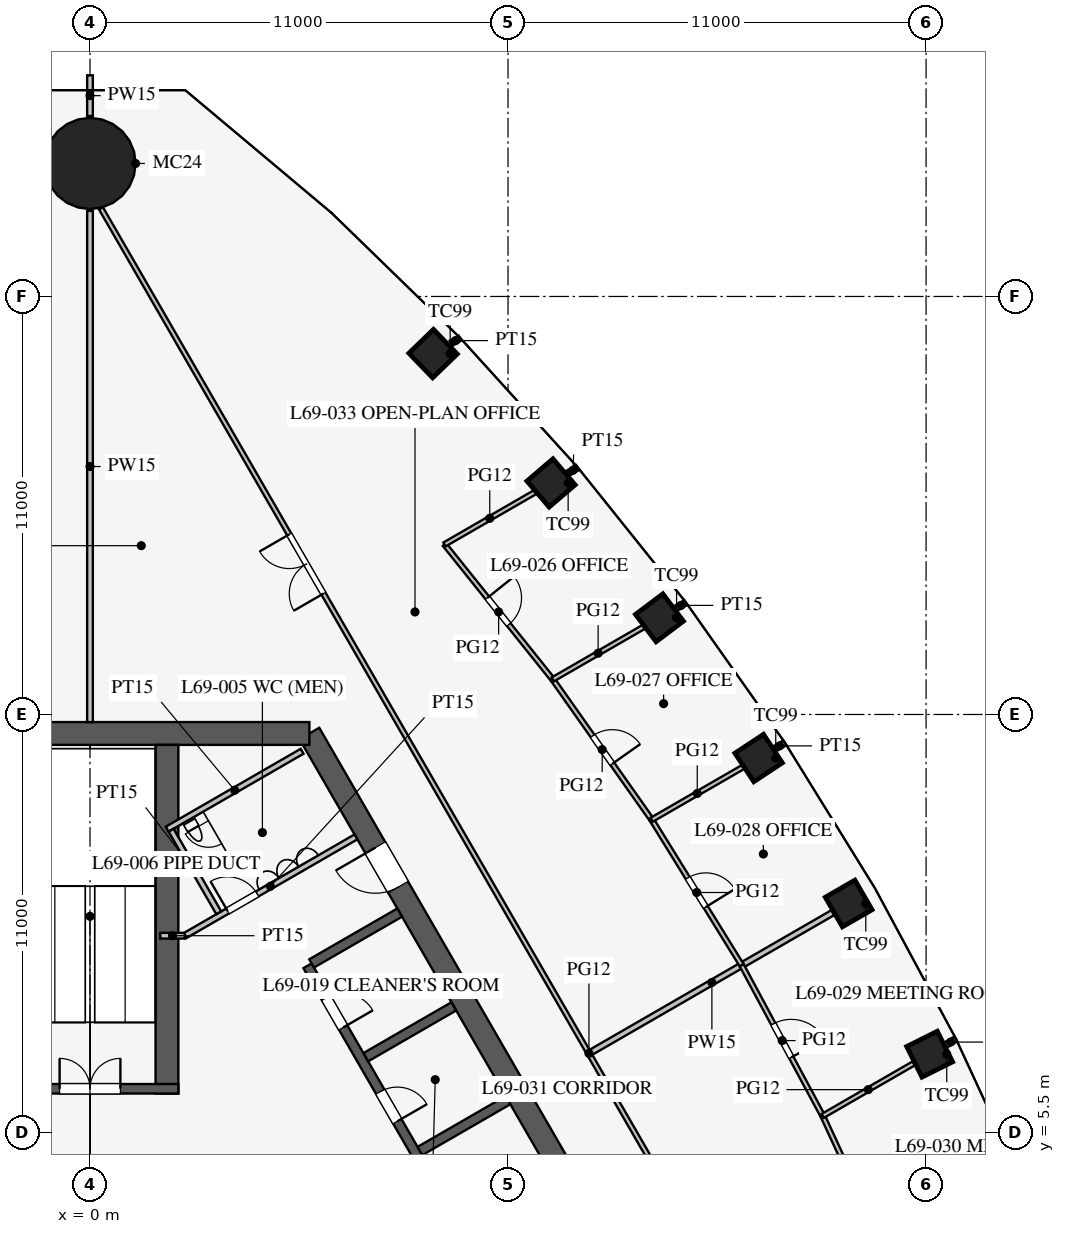
"""IFC4 building model, lengths in metres.
Left out: names, types, materials, properties, quantities, classifications, styles, units other than length and angle.
Written with IfcOpenShell. Run it as: python <this file> out.ifc"""

import sys

from ifc_helpers import new_model, si_unit, direction, frame, frame_2d, origin, origin_2d, place, context, subcontext, project, spatial, rectangle, circle, extrude, element, fill, save


model = new_model("IFC4")
c1 = context("Model", 3, precision=1e-05, world=origin(), true_north=direction((0.0, 1.0)))
c2 = subcontext(c1, "Body", "Model", "MODEL_VIEW")
j1 = project(units=[si_unit("LENGTHUNIT", "METRE"), si_unit("PLANEANGLEUNIT", "RADIAN")], contexts=[c1])
p1 = place(None, origin())
s1 = spatial("IfcSite", under=j1, at=p1, CompositionType="ELEMENT")
p2 = place(p1, origin())
s2 = spatial("IfcBuilding", under=s1, at=p2, CompositionType="ELEMENT")
p3 = place(p2, frame((0.0, 0.0, 301.5)))
s3 = spatial("IfcBuildingStorey", under=s2, at=p3, CompositionType="ELEMENT", Elevation=301.5)
for number, where, z_axis, x_axis in (
    (1, (22.094, 7.56, 0.0), (0.0, 0.0, 1.0), (-0.447, 0.895, 0.0)),
    (2, (19.963, 11.526, 0.0), (0.0, 0.0, 1.0), (-0.5, 0.866, 0.0)),
    (3, (17.594, 15.354, 0.0), (0.0, 0.0, 1.0), (-0.552, 0.834, 0.0)),
    (4, (14.985, 19.044, 0.0), (0.0, 0.0, 1.0), (-0.601, 0.799, 0.0)),
    (5, (12.132, 22.593, 0.0), (0.0, 0.0, 1.0), (-0.649, 0.761, 0.0)),
    (6, (9.027, 25.997, 0.0), (0.0, 0.0, 1.0), (-0.695, 0.719, 0.0)),
):
    element("IfcColumn", number, at=place(p3, frame(where, z_axis=z_axis, x_axis=x_axis)), inside=s3, PredefinedType="COLUMN", context=c2, shape_type="SweptSolid", body=[
        extrude(rectangle(XDim=0.9, YDim=0.9, at=origin_2d()), origin(), (0.0, 0.0, 1.0), 4.2),
    ])
p4 = place(p3, frame((0.0, 31.0, 0.0), z_axis=(0.0, 0.0, 1.0), x_axis=(1.0, 0.0, 0.0)))
e7 = element("IfcColumn", 7, at=p4, inside=s3, PredefinedType="COLUMN", context=c2, shape_type="SweptSolid", body=[
    extrude(circle(Radius=1.2, at=origin_2d()), origin(), (0.0, 0.0, 1.0), 4.2),
])
p5 = place(p3, frame((16.743, -3.0, 0.0), z_axis=(0.0, 0.0, 1.0), x_axis=(-0.500002442456, 0.866023993627, 0.0)))
e8 = element("IfcWall", 8, at=p5, inside=s3, PredefinedType="SHEAR", context=c2, shape_type="SweptSolid", body=[
    extrude(rectangle(XDim=21.939, YDim=0.6, at=frame_2d((10.97, 0.0))), origin(), (0.0, 0.0, 1.0), 4.2),
])
p6 = place(p5, frame((17.27, 0.0, 0.0)))
e9 = element("IfcOpeningElement", 9, at=p6, cuts=e8, PredefinedType="OPENING", context=c2, shape_type="SweptSolid", body=[
    extrude(rectangle(XDim=1.2, YDim=2.1, at=frame_2d((0.6, 1.05))), frame((0.0, 0.31, 0.0), z_axis=(0.0, -1.0, 0.0), x_axis=(1.0, 0.0, 0.0)), (0.0, 0.0, 1.0), 0.62),
])
p7 = place(p5, frame((3.47, 0.0, 0.0)))
e10 = element("IfcOpeningElement", 10, at=p7, cuts=e8, PredefinedType="OPENING", context=c2, shape_type="SweptSolid", body=[
    extrude(rectangle(XDim=1.2, YDim=2.1, at=frame_2d((0.6, 1.05))), frame((0.0, 0.31, 0.0), z_axis=(0.0, -1.0, 0.0), x_axis=(1.0, 0.0, 0.0)), (0.0, 0.0, 1.0), 0.62),
])
p8 = place(p3, frame((5.773, 16.0, 0.0), z_axis=(0.0, 0.0, 1.0), x_axis=(-1.0, 0.0, 0.0)))
e11 = element("IfcWall", 11, at=p8, inside=s3, PredefinedType="SHEAR", context=c2, shape_type="SweptSolid", body=[
    extrude(rectangle(XDim=11.547, YDim=0.6, at=frame_2d((5.773, 0.0))), origin(), (0.0, 0.0, 1.0), 4.2),
])
p9 = place(p3, frame((11.424, 0.014, 0.0), z_axis=(0.0, 0.0, 1.0), x_axis=(-0.500001763848, 0.866024385424, 0.0)))
e12 = element("IfcWall", 12, at=p9, inside=s3, PredefinedType="SHEAR", context=c2, shape_type="SweptSolid", body=[
    extrude(rectangle(XDim=11.4, YDim=0.25, at=frame_2d((5.7, 0.0))), origin(), (0.0, 0.0, 1.0), 4.2),
])
p10 = place(p9, frame((0.975, 0.0, 0.0)))
e13 = element("IfcOpeningElement", 13, at=p10, cuts=e12, PredefinedType="OPENING", context=c2, shape_type="SweptSolid", body=[
    extrude(rectangle(XDim=0.9, YDim=2.1, at=frame_2d((0.45, 1.05))), frame((0.0, 0.135, 0.0), z_axis=(0.0, -1.0, 0.0), x_axis=(1.0, 0.0, 0.0)), (0.0, 0.0, 1.0), 0.27),
])
p11 = place(p9, frame((3.825, 0.0, 0.0)))
e14 = element("IfcOpeningElement", 14, at=p11, cuts=e12, PredefinedType="OPENING", context=c2, shape_type="SweptSolid", body=[
    extrude(rectangle(XDim=0.9, YDim=2.1, at=frame_2d((0.45, 1.05))), frame((0.0, 0.135, 0.0), z_axis=(0.0, -1.0, 0.0), x_axis=(1.0, 0.0, 0.0)), (0.0, 0.0, 1.0), 0.27),
])
p12 = place(p9, frame((6.675, 0.0, 0.0)))
e15 = element("IfcOpeningElement", 15, at=p12, cuts=e12, PredefinedType="OPENING", context=c2, shape_type="SweptSolid", body=[
    extrude(rectangle(XDim=0.9, YDim=2.1, at=frame_2d((0.45, 1.05))), frame((0.0, 0.135, 0.0), z_axis=(0.0, -1.0, 0.0), x_axis=(1.0, 0.0, 0.0)), (0.0, 0.0, 1.0), 0.27),
])
p13 = place(p9, frame((9.525, 0.0, 0.0)))
e16 = element("IfcOpeningElement", 16, at=p13, cuts=e12, PredefinedType="OPENING", context=c2, shape_type="SweptSolid", body=[
    extrude(rectangle(XDim=0.9, YDim=2.1, at=frame_2d((0.45, 1.05))), frame((0.0, 0.135, 0.0), z_axis=(0.0, -1.0, 0.0), x_axis=(1.0, 0.0, 0.0)), (0.0, 0.0, 1.0), 0.27),
])
for number, where, z_axis, x_axis in (
    (17, (8.682, 5.012, 0.0), (0.0, 0.0, 1.0), (0.866, 0.5, 0.0)),
    (18, (7.257, 7.481, 0.0), (0.0, 0.0, 1.0), (0.866, 0.5, 0.0)),
    (19, (5.832, 9.949, 0.0), (0.0, 0.0, 1.0), (0.866, 0.5, 0.0)),
):
    element("IfcWall", number, at=place(p3, frame(where, z_axis=z_axis, x_axis=x_axis)), inside=s3, PredefinedType="SHEAR", context=c2, shape_type="SweptSolid", body=[
        extrude(rectangle(XDim=2.675, YDim=0.25, at=frame_2d((1.337, 0.0))), origin(), (0.0, 0.0, 1.0), 4.2),
    ])
p14 = place(p3, frame((2.025, 6.525, 0.0), z_axis=(0.0, 0.0, 1.0), x_axis=(0.0, 1.0, 0.0)))
e20 = element("IfcWall", 20, at=p14, inside=s3, PredefinedType="SHEAR", context=c2, shape_type="SweptSolid", body=[
    extrude(rectangle(XDim=9.175, YDim=0.6, at=frame_2d((4.587, 0.0))), origin(), (0.0, 0.0, 1.0), 4.2),
])
p15 = place(p3, frame((2.325, 6.65, 0.0), z_axis=(0.0, 0.0, 1.0), x_axis=(-1.0, 0.0, 0.0)))
e21 = element("IfcWall", 21, at=p15, inside=s3, PredefinedType="SHEAR", context=c2, shape_type="SweptSolid", body=[
    extrude(rectangle(XDim=4.65, YDim=0.25, at=frame_2d((2.325, 0.0))), origin(), (0.0, 0.0, 1.0), 4.2),
])
p16 = place(p15, frame((1.525, 0.0, 0.0)))
e22 = element("IfcOpeningElement", 22, at=p16, cuts=e21, PredefinedType="OPENING", context=c2, shape_type="SweptSolid", body=[
    extrude(rectangle(XDim=1.6, YDim=2.1, at=frame_2d((0.8, 1.05))), frame((0.0, 0.135, 0.0), z_axis=(0.0, -1.0, 0.0), x_axis=(1.0, 0.0, 0.0)), (0.0, 0.0, 1.0), 0.27),
])
p17 = place(p3, frame((2.495, 10.678, 0.0), z_axis=(0.0, 0.0, 1.0), x_axis=(0.866021400173, 0.500006934395, 0.0)))
e23 = element("IfcWall", 23, at=p17, inside=s3, PredefinedType="PARTITIONING", context=c2, shape_type="SweptSolid", body=[
    extrude(rectangle(XDim=5.2, YDim=0.15, at=frame_2d((2.6, 0.0))), origin(), (0.0, 0.0, 1.0), 4.0),
])
p18 = place(p17, frame((1.3, 0.0, 0.0)))
e24 = element("IfcOpeningElement", 24, at=p18, cuts=e23, PredefinedType="OPENING", context=c2, shape_type="SweptSolid", body=[
    extrude(rectangle(XDim=0.9, YDim=2.1, at=frame_2d((0.45, 1.05))), frame((0.0, 0.085, 0.0), z_axis=(0.0, -1.0, 0.0), x_axis=(1.0, 0.0, 0.0)), (0.0, 0.0, 1.0), 0.17),
])
p19 = place(p3, frame((2.495, 10.678, 0.0), z_axis=(0.0, 0.0, 1.0), x_axis=(-1.0, 0.0, 0.0)))
e25 = element("IfcWall", 25, at=p19, inside=s3, PredefinedType="PARTITIONING", context=c2, shape_type="SweptSolid", body=[
    extrude(rectangle(XDim=0.645, YDim=0.15, at=frame_2d((0.323, 0.0))), origin(), (0.0, 0.0, 1.0), 4.0),
])
p20 = place(p3, frame((2.031, 13.482, 0.0), z_axis=(0.0, 0.0, 1.0), x_axis=(0.866050731258, 0.499956128963, 0.0)))
e26 = element("IfcWall", 26, at=p20, inside=s3, PredefinedType="PARTITIONING", context=c2, shape_type="SweptSolid", body=[
    extrude(rectangle(XDim=4.1, YDim=0.15, at=frame_2d((2.05, 0.0))), origin(), (0.0, 0.0, 1.0), 4.0),
])
p21 = place(p3, frame((3.389, 11.281, 0.0), z_axis=(0.0, 0.0, 1.0), x_axis=(-0.499989096993, 0.866031698547, 0.0)))
e27 = element("IfcWall", 27, at=p21, inside=s3, PredefinedType="PARTITIONING", context=c2, shape_type="SweptSolid", body=[
    extrude(rectangle(XDim=2.51, YDim=0.15, at=frame_2d((1.255, 0.0))), origin(), (0.0, 0.0, 1.0), 4.0),
])
p22 = place(p3, frame((0.0, 16.3, 0.0), z_axis=(0.0, 0.0, 1.0), x_axis=(0.0, 1.0, 0.0)))
e28 = element("IfcWall", 28, at=p22, inside=s3, PredefinedType="PARTITIONING", context=c2, shape_type="SweptSolid", body=[
    extrude(rectangle(XDim=13.45, YDim=0.15, at=frame_2d((6.725, 0.0))), origin(), (0.0, 0.0, 1.0), 2.5),
])
p23 = place(p3, frame((0.0, 32.25, 0.0), z_axis=(0.0, 0.0, 1.0), x_axis=(0.0, 1.0, 0.0)))
e29 = element("IfcWall", 29, at=p23, inside=s3, PredefinedType="PARTITIONING", context=c2, shape_type="SweptSolid", body=[
    extrude(rectangle(XDim=1.07, YDim=0.15, at=frame_2d((0.535, 0.0))), origin(), (0.0, 0.0, 1.0), 2.5),
])
p24 = place(p3, frame((13.181, 7.61, 0.0), z_axis=(0.0, 0.0, 1.0), x_axis=(0.866027421574, 0.49999650507, 0.0)))
e30 = element("IfcWall", 30, at=p24, inside=s3, PredefinedType="PARTITIONING", context=c2, shape_type="SweptSolid", body=[
    extrude(rectangle(XDim=7.352, YDim=0.15, at=frame_2d((3.676, 0.0))), origin(), (0.0, 0.0, 1.0), 3.3),
])
p25 = place(p3, frame((25.968, -14.657, 0.0), z_axis=(0.0, 0.0, 1.0), x_axis=(-0.500000361757, 0.866025194924, 0.0)))
e31 = element("IfcWall", 31, at=p25, inside=s3, PredefinedType="PARTITIONING", context=c2, shape_type="SweptSolid", body=[
    extrude(rectangle(XDim=51.355, YDim=0.12, at=frame_2d((25.678, 0.0))), origin(), (0.0, 0.0, 1.0), 2.9),
])
p26 = place(p25, frame((9.9, 0.0, 0.15)))
e32 = element("IfcOpeningElement", 32, at=p26, cuts=e31, PredefinedType="OPENING", context=c2, shape_type="SweptSolid", body=[
    extrude(rectangle(XDim=1.8, YDim=2.1, at=frame_2d((0.9, 1.05))), frame((0.0, 0.07, 0.0), z_axis=(0.0, -1.0, 0.0), x_axis=(1.0, 0.0, 0.0)), (0.0, 0.0, 1.0), 0.14),
])
p27 = place(p25, frame((39.65, 0.0, 0.15)))
e33 = element("IfcOpeningElement", 33, at=p27, cuts=e31, PredefinedType="OPENING", context=c2, shape_type="SweptSolid", body=[
    extrude(rectangle(XDim=1.8, YDim=2.1, at=frame_2d((0.9, 1.05))), frame((0.0, 0.07, 0.0), z_axis=(0.0, -1.0, 0.0), x_axis=(1.0, 0.0, 0.0)), (0.0, 0.0, 1.0), 0.14),
])
p28 = place(p3, frame((12.589, 22.857, 0.0), z_axis=(0.0, 0.0, 1.0), x_axis=(0.865982457891, 0.500074377092, 0.0)))
e34 = element("IfcWall", 34, at=p28, inside=s3, PredefinedType="PARTITIONING", context=c2, shape_type="SweptSolid", body=[
    extrude(rectangle(XDim=0.28, YDim=0.15, at=frame_2d((0.14, 0.0))), origin(), (0.0, 0.0, 1.0), 2.9),
])
p29 = place(p3, frame((9.504, 26.271, 0.0), z_axis=(0.0, 0.0, 1.0), x_axis=(0.866004557827, 0.500036104519, 0.0)))
e35 = element("IfcWall", 35, at=p29, inside=s3, PredefinedType="PARTITIONING", context=c2, shape_type="SweptSolid", body=[
    extrude(rectangle(XDim=0.27, YDim=0.15, at=frame_2d((0.135, 0.0))), origin(), (0.0, 0.0, 1.0), 2.9),
])
p30 = place(p3, frame((18.01, 15.594, 0.0), z_axis=(0.0, 0.0, 1.0), x_axis=(0.866095534226, 0.499878510834, 0.0)))
e36 = element("IfcWall", 36, at=p30, inside=s3, PredefinedType="PARTITIONING", context=c2, shape_type="SweptSolid", body=[
    extrude(rectangle(XDim=0.316, YDim=0.15, at=frame_2d((0.158, 0.0))), origin(), (0.0, 0.0, 1.0), 2.9),
])
p31 = place(p3, frame((15.422, 19.296, 0.0), z_axis=(0.0, 0.0, 1.0), x_axis=(0.865896854829, 0.500222587251, 0.0)))
e37 = element("IfcWall", 37, at=p31, inside=s3, PredefinedType="PARTITIONING", context=c2, shape_type="SweptSolid", body=[
    extrude(rectangle(XDim=0.296, YDim=0.15, at=frame_2d((0.148, 0.0))), origin(), (0.0, 0.0, 1.0), 2.9),
])
p32 = place(p3, frame((22.51, 7.8, 0.0), z_axis=(0.0, 0.0, 1.0), x_axis=(0.866095534226, 0.499878510834, 0.0)))
e38 = element("IfcWall", 38, at=p32, inside=s3, PredefinedType="PARTITIONING", context=c2, shape_type="SweptSolid", body=[
    extrude(rectangle(XDim=0.316, YDim=0.15, at=frame_2d((0.158, 0.0))), origin(), (0.0, 0.0, 1.0), 2.9),
])
p33 = place(p3, frame((17.149, 9.901, 0.0), z_axis=(0.0, 0.0, 1.0), x_axis=(-0.525981173851, 0.850496210899, 0.0)))
e39 = element("IfcWall", 39, at=p33, inside=s3, PredefinedType="PARTITIONING", context=c2, shape_type="SweptSolid", body=[
    extrude(rectangle(XDim=4.502, YDim=0.12, at=frame_2d((2.251, 0.0))), origin(), (0.0, 0.0, 1.0), 2.9),
])
p34 = place(p33, frame((1.8, 0.0, 0.15)))
e40 = element("IfcOpeningElement", 40, at=p34, cuts=e39, PredefinedType="OPENING", context=c2, shape_type="SweptSolid", body=[
    extrude(rectangle(XDim=0.9, YDim=2.1, at=frame_2d((0.45, 1.05))), frame((0.0, 0.07, 0.0), z_axis=(0.0, -1.0, 0.0), x_axis=(1.0, 0.0, 0.0)), (0.0, 0.0, 1.0), 0.14),
])
p35 = place(p3, frame((14.781, 13.73, 0.0), z_axis=(0.0, 0.0, 1.0), x_axis=(-0.576572893039, 0.817045714151, 0.0)))
e41 = element("IfcWall", 41, at=p35, inside=s3, PredefinedType="PARTITIONING", context=c2, shape_type="SweptSolid", body=[
    extrude(rectangle(XDim=4.519, YDim=0.12, at=frame_2d((2.259, 0.0))), origin(), (0.0, 0.0, 1.0), 2.9),
])
p36 = place(p35, frame((1.8, 0.0, 0.15)))
e42 = element("IfcOpeningElement", 42, at=p36, cuts=e41, PredefinedType="OPENING", context=c2, shape_type="SweptSolid", body=[
    extrude(rectangle(XDim=0.9, YDim=2.1, at=frame_2d((0.45, 1.05))), frame((0.0, 0.07, 0.0), z_axis=(0.0, -1.0, 0.0), x_axis=(1.0, 0.0, 0.0)), (0.0, 0.0, 1.0), 0.14),
])
p37 = place(p3, frame((12.175, 17.422, 0.0), z_axis=(0.0, 0.0, 1.0), x_axis=(-0.625290045305, 0.780392439252, 0.0)))
e43 = element("IfcWall", 43, at=p37, inside=s3, PredefinedType="PARTITIONING", context=c2, shape_type="SweptSolid", body=[
    extrude(rectangle(XDim=4.552, YDim=0.12, at=frame_2d((2.276, 0.0))), origin(), (0.0, 0.0, 1.0), 2.9),
])
p38 = place(p37, frame((1.85, 0.0, 0.15)))
e44 = element("IfcOpeningElement", 44, at=p38, cuts=e43, PredefinedType="OPENING", context=c2, shape_type="SweptSolid", body=[
    extrude(rectangle(XDim=0.9, YDim=2.1, at=frame_2d((0.45, 1.05))), frame((0.0, 0.07, 0.0), z_axis=(0.0, -1.0, 0.0), x_axis=(1.0, 0.0, 0.0)), (0.0, 0.0, 1.0), 0.14),
])
p39 = place(p3, frame((19.281, 5.936, 0.0), z_axis=(0.0, 0.0, 1.0), x_axis=(-0.473566170147, 0.880758242932, 0.0)))
e45 = element("IfcWall", 45, at=p39, inside=s3, PredefinedType="PARTITIONING", context=c2, shape_type="SweptSolid", body=[
    extrude(rectangle(XDim=4.502, YDim=0.12, at=frame_2d((2.251, 0.0))), origin(), (0.0, 0.0, 1.0), 2.9),
])
p40 = place(p39, frame((1.75, 0.0, 0.15)))
e46 = element("IfcOpeningElement", 46, at=p40, cuts=e45, PredefinedType="OPENING", context=c2, shape_type="SweptSolid", body=[
    extrude(rectangle(XDim=1.0, YDim=2.1, at=frame_2d((0.5, 1.05))), frame((0.0, 0.07, 0.0), z_axis=(0.0, -1.0, 0.0), x_axis=(1.0, 0.0, 0.0)), (0.0, 0.0, 1.0), 0.14),
])
p41 = place(p3, frame((21.175, 1.833, 0.0), z_axis=(0.0, 0.0, 1.0), x_axis=(-0.419270595022, 0.907861315483, 0.0)))
e47 = element("IfcWall", 47, at=p41, inside=s3, PredefinedType="PARTITIONING", context=c2, shape_type="SweptSolid", body=[
    extrude(rectangle(XDim=4.519, YDim=0.12, at=frame_2d((2.259, 0.0))), origin(), (0.0, 0.0, 1.0), 2.9),
])
p42 = place(p41, frame((1.75, 0.0, 0.15)))
e48 = element("IfcOpeningElement", 48, at=p42, cuts=e47, PredefinedType="OPENING", context=c2, shape_type="SweptSolid", body=[
    extrude(rectangle(XDim=1.0, YDim=2.1, at=frame_2d((0.5, 1.05))), frame((0.0, 0.07, 0.0), z_axis=(0.0, -1.0, 0.0), x_axis=(1.0, 0.0, 0.0)), (0.0, 0.0, 1.0), 0.14),
])
p43 = place(p3, frame((9.329, 20.974, 0.0), z_axis=(0.0, 0.0, 1.0), x_axis=(0.866031754707, 0.499988999718, 0.0)))
e49 = element("IfcWall", 49, at=p43, inside=s3, PredefinedType="PARTITIONING", context=c2, shape_type="SweptSolid", body=[
    extrude(rectangle(XDim=2.749, YDim=0.12, at=frame_2d((1.374, 0.0))), origin(), (0.0, 0.0, 1.0), 2.9),
])
p44 = place(p3, frame((14.781, 13.73, 0.0), z_axis=(0.0, 0.0, 1.0), x_axis=(0.866019581949, 0.500010083578, 0.0)))
e50 = element("IfcWall", 50, at=p44, inside=s3, PredefinedType="PARTITIONING", context=c2, shape_type="SweptSolid", body=[
    extrude(rectangle(XDim=2.768, YDim=0.12, at=frame_2d((1.384, 0.0))), origin(), (0.0, 0.0, 1.0), 2.9),
])
p45 = place(p3, frame((12.175, 17.422, 0.0), z_axis=(0.0, 0.0, 1.0), x_axis=(0.866063358106, 0.499934255424, 0.0)))
e51 = element("IfcWall", 51, at=p45, inside=s3, PredefinedType="PARTITIONING", context=c2, shape_type="SweptSolid", body=[
    extrude(rectangle(XDim=2.76, YDim=0.12, at=frame_2d((1.38, 0.0))), origin(), (0.0, 0.0, 1.0), 2.9),
])
p46 = place(p3, frame((19.281, 5.936, 0.0), z_axis=(0.0, 0.0, 1.0), x_axis=(0.866019581949, 0.500010083578, 0.0)))
e52 = element("IfcWall", 52, at=p46, inside=s3, PredefinedType="PARTITIONING", context=c2, shape_type="SweptSolid", body=[
    extrude(rectangle(XDim=2.768, YDim=0.12, at=frame_2d((1.384, 0.0))), origin(), (0.0, 0.0, 1.0), 2.9),
])
p47 = place(p18, origin())
e53 = element("IfcDoor", 53, at=p47, inside=s3, OperationType="SINGLE_SWING_LEFT", PredefinedType="DOOR", context=c2, shape_type="SweptSolid", body=[
    extrude(rectangle(XDim=0.9, YDim=2.1, at=frame_2d((0.45, 1.05))), frame((0.0, 0.025, 0.0), z_axis=(0.0, -1.0, 0.0), x_axis=(1.0, 0.0, 0.0)), (0.0, 0.0, 1.0), 0.05),
])
fill(e24, e53)
p48 = place(p16, frame((1.6, 0.0, 0.0), z_axis=(0.0, 0.0, 1.0), x_axis=(-1.0, 0.0, 0.0)))
e54 = element("IfcDoor", 54, at=p48, inside=s3, OperationType="DOUBLE_DOOR_SINGLE_SWING", PredefinedType="DOOR", context=c2, shape_type="SweptSolid", body=[
    extrude(rectangle(XDim=1.6, YDim=2.1, at=frame_2d((0.8, 1.05))), frame((0.0, 0.025, 0.0), z_axis=(0.0, -1.0, 0.0), x_axis=(1.0, 0.0, 0.0)), (0.0, 0.0, 1.0), 0.05),
])
fill(e22, e54)
p49 = place(p6, origin())
e55 = element("IfcDoor", 55, at=p49, inside=s3, OperationType="SINGLE_SWING_RIGHT", PredefinedType="DOOR", context=c2, shape_type="SweptSolid", body=[
    extrude(rectangle(XDim=1.2, YDim=2.1, at=frame_2d((0.6, 1.05))), frame((0.0, 0.025, 0.0), z_axis=(0.0, -1.0, 0.0), x_axis=(1.0, 0.0, 0.0)), (0.0, 0.0, 1.0), 0.05),
])
fill(e9, e55)
p50 = place(p12, frame((0.9, 0.0, 0.0), z_axis=(0.0, 0.0, 1.0), x_axis=(-1.0, 0.0, 0.0)))
e56 = element("IfcDoor", 56, at=p50, inside=s3, OperationType="SINGLE_SWING_RIGHT", PredefinedType="DOOR", context=c2, shape_type="SweptSolid", body=[
    extrude(rectangle(XDim=0.9, YDim=2.1, at=frame_2d((0.45, 1.05))), frame((0.0, 0.025, 0.0), z_axis=(0.0, -1.0, 0.0), x_axis=(1.0, 0.0, 0.0)), (0.0, 0.0, 1.0), 0.05),
])
fill(e15, e56)
p51 = place(p13, frame((0.9, 0.0, 0.0), z_axis=(0.0, 0.0, 1.0), x_axis=(-1.0, 0.0, 0.0)))
e57 = element("IfcDoor", 57, at=p51, inside=s3, OperationType="SINGLE_SWING_RIGHT", PredefinedType="DOOR", context=c2, shape_type="SweptSolid", body=[
    extrude(rectangle(XDim=0.9, YDim=2.1, at=frame_2d((0.45, 1.05))), frame((0.0, 0.025, 0.0), z_axis=(0.0, -1.0, 0.0), x_axis=(1.0, 0.0, 0.0)), (0.0, 0.0, 1.0), 0.05),
])
fill(e16, e57)
p52 = place(p38, frame((0.9, 0.0, 0.0), z_axis=(0.0, 0.0, 1.0), x_axis=(-1.0, 0.0, 0.0)))
e58 = element("IfcDoor", 58, at=p52, inside=s3, OperationType="SINGLE_SWING_LEFT", PredefinedType="DOOR", context=c2, shape_type="SweptSolid", body=[
    extrude(rectangle(XDim=0.9, YDim=2.1, at=frame_2d((0.45, 1.05))), frame((0.0, 0.025, 0.0), z_axis=(0.0, -1.0, 0.0), x_axis=(1.0, 0.0, 0.0)), (0.0, 0.0, 1.0), 0.05),
])
fill(e44, e58)
p53 = place(p36, frame((0.9, 0.0, 0.0), z_axis=(0.0, 0.0, 1.0), x_axis=(-1.0, 0.0, 0.0)))
e59 = element("IfcDoor", 59, at=p53, inside=s3, OperationType="SINGLE_SWING_RIGHT", PredefinedType="DOOR", context=c2, shape_type="SweptSolid", body=[
    extrude(rectangle(XDim=0.9, YDim=2.1, at=frame_2d((0.45, 1.05))), frame((0.0, 0.025, 0.0), z_axis=(0.0, -1.0, 0.0), x_axis=(1.0, 0.0, 0.0)), (0.0, 0.0, 1.0), 0.05),
])
fill(e42, e59)
p54 = place(p34, frame((0.9, 0.0, 0.0), z_axis=(0.0, 0.0, 1.0), x_axis=(-1.0, 0.0, 0.0)))
e60 = element("IfcDoor", 60, at=p54, inside=s3, OperationType="SINGLE_SWING_RIGHT", PredefinedType="DOOR", context=c2, shape_type="SweptSolid", body=[
    extrude(rectangle(XDim=0.9, YDim=2.1, at=frame_2d((0.45, 1.05))), frame((0.0, 0.025, 0.0), z_axis=(0.0, -1.0, 0.0), x_axis=(1.0, 0.0, 0.0)), (0.0, 0.0, 1.0), 0.05),
])
fill(e40, e60)
p55 = place(p40, frame((1.0, 0.0, 0.0), z_axis=(0.0, 0.0, 1.0), x_axis=(-1.0, 0.0, 0.0)))
e61 = element("IfcDoor", 61, at=p55, inside=s3, OperationType="SINGLE_SWING_RIGHT", PredefinedType="DOOR", context=c2, shape_type="SweptSolid", body=[
    extrude(rectangle(XDim=1.0, YDim=2.1, at=frame_2d((0.5, 1.05))), frame((0.0, 0.025, 0.0), z_axis=(0.0, -1.0, 0.0), x_axis=(1.0, 0.0, 0.0)), (0.0, 0.0, 1.0), 0.05),
])
fill(e46, e61)
p56 = place(p27, origin())
e62 = element("IfcDoor", 62, at=p56, inside=s3, OperationType="DOUBLE_DOOR_SINGLE_SWING", PredefinedType="DOOR", context=c2, shape_type="SweptSolid", body=[
    extrude(rectangle(XDim=1.8, YDim=2.1, at=frame_2d((0.9, 1.05))), frame((0.0, 0.025, 0.0), z_axis=(0.0, -1.0, 0.0), x_axis=(1.0, 0.0, 0.0)), (0.0, 0.0, 1.0), 0.05),
])
fill(e33, e62)
save(model, sys.argv[1])
